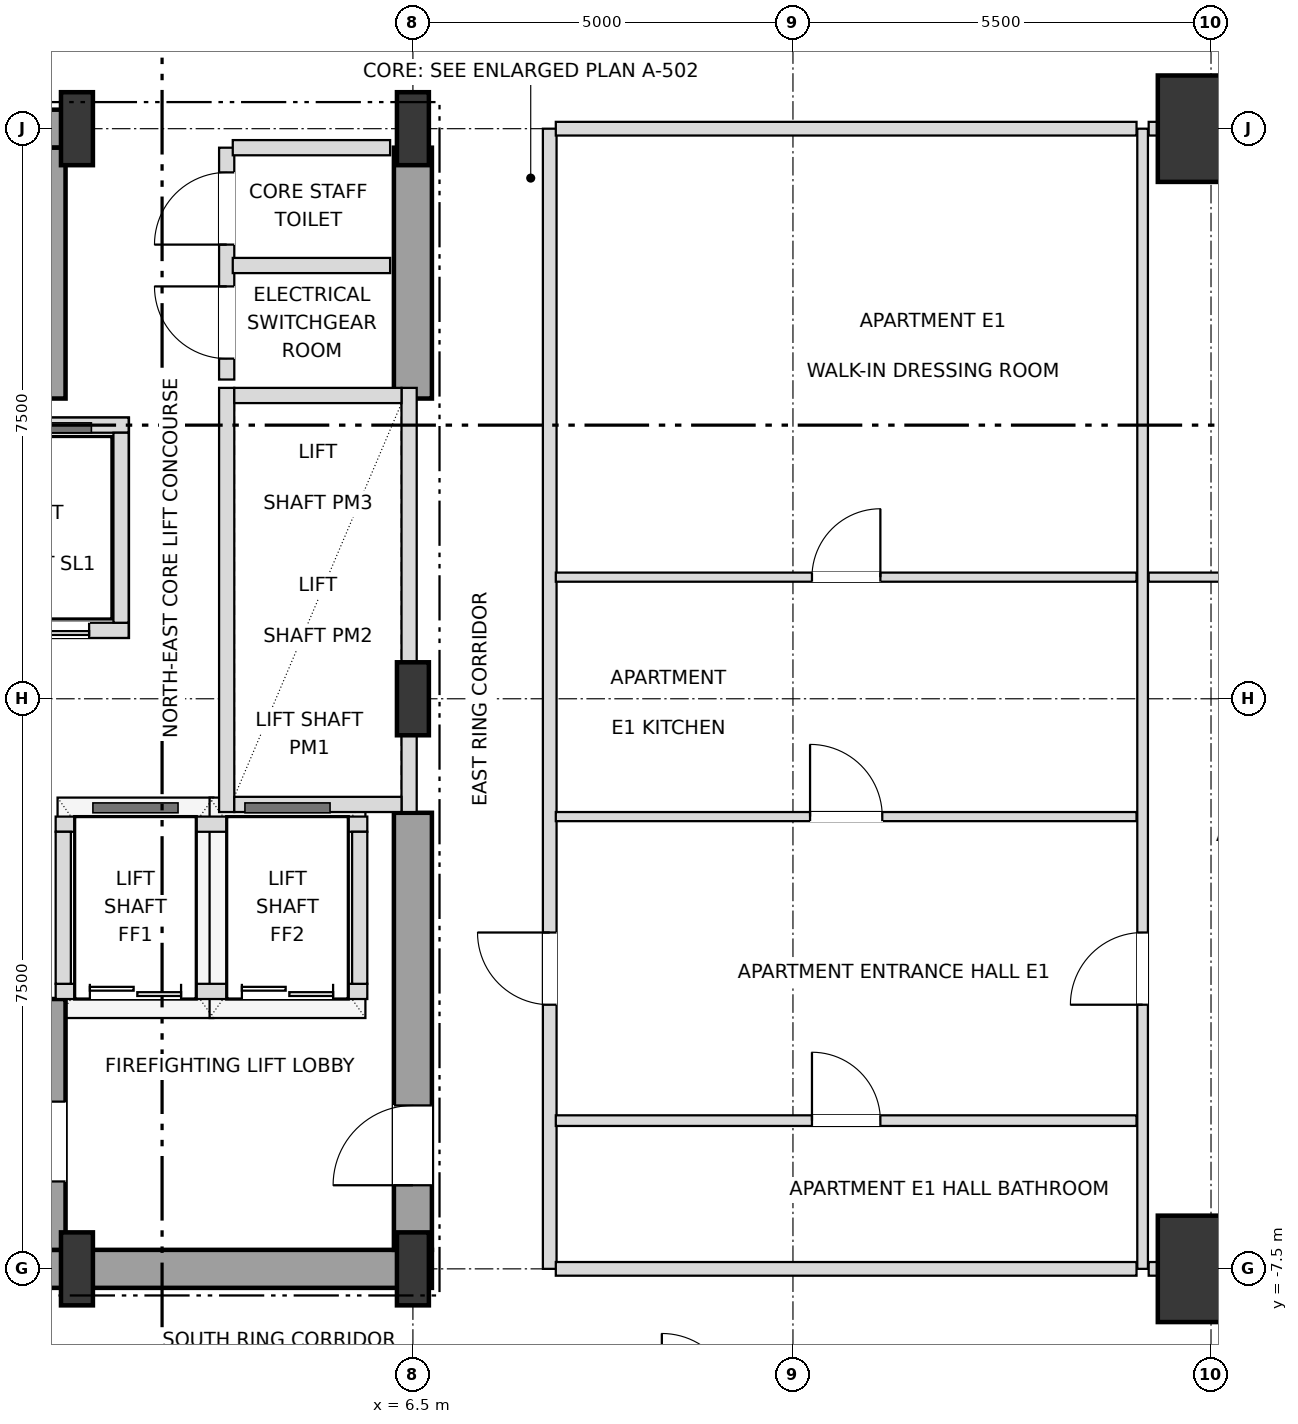
"""IFC4 building model, lengths in metres.
Left out: names, types, materials, properties, quantities, classifications, styles, units other than length and angle.
Written with IfcOpenShell. Run it as: python <this file> out.ifc"""

import sys

from ifc_helpers import new_model, si_unit, direction, frame, frame_2d, origin, origin_2d, place, context, subcontext, project, spatial, rectangle, i_section, extrude, element, fill, save


model = new_model("IFC4")
c1 = context("Model", 3, precision=1e-05, world=origin(), true_north=direction((0.0, 1.0)))
c2 = subcontext(c1, "Body", "Model", "MODEL_VIEW")
j1 = project(units=[si_unit("LENGTHUNIT", "METRE"), si_unit("PLANEANGLEUNIT", "RADIAN")], contexts=[c1])
p1 = place(None, origin())
s1 = spatial("IfcSite", under=j1, at=p1, CompositionType="ELEMENT")
p2 = place(p1, origin())
s2 = spatial("IfcBuilding", under=s1, at=p2, CompositionType="ELEMENT")
p3 = place(p2, frame((0.0, 0.0, 39.6)))
s3 = spatial("IfcBuildingStorey", under=s2, at=p3, CompositionType="ELEMENT", Elevation=39.6)
for number, where, z_axis, x_axis in (
    (1, (2.08, -7.5, 0.0), (0.0, 0.0, 1.0), (1.0, 0.0, 0.0)),
    (2, (6.5, -7.5, 0.0), (0.0, 0.0, 1.0), (1.0, 0.0, 0.0)),
    (3, (6.5, 0.0, 0.0), (0.0, 0.0, 1.0), (1.0, 0.0, 0.0)),
    (4, (2.08, 7.5, 0.0), (0.0, 0.0, 1.0), (1.0, 0.0, 0.0)),
    (5, (6.5, 7.5, 0.0), (0.0, 0.0, 1.0), (1.0, 0.0, 0.0)),
):
    element("IfcColumn", number, at=place(p3, frame(where, z_axis=z_axis, x_axis=x_axis)), inside=s3, PredefinedType="COLUMN", context=c2, shape_type="SweptSolid", body=[
        extrude(i_section(OverallWidth=0.42, OverallDepth=0.96, WebThickness=0.022, FlangeThickness=0.034, at=origin_2d()), origin(), (0.0, 0.0, 1.0), 3.6),
    ])
for number, where, z_axis, x_axis in (
    (6, (17.0, -7.5, 0.0), (0.0, 0.0, 1.0), (1.0, 0.0, 0.0)),
    (7, (17.0, 7.5, 0.0), (0.0, 0.0, 1.0), (1.0, 0.0, 0.0)),
):
    element("IfcColumn", number, at=place(p3, frame(where, z_axis=z_axis, x_axis=x_axis)), inside=s3, PredefinedType="USERDEFINED", context=c2, shape_type="SweptSolid", body=[
        extrude(rectangle(XDim=1.4, YDim=1.4, at=origin_2d()), origin(), (0.0, 0.0, 1.0), 3.6),
    ])
p4 = place(p3, frame((0.0, -7.5, 0.0), z_axis=(0.0, 0.0, 1.0), x_axis=(1.0, 0.0, 0.0)))
e8 = element("IfcWall", 8, at=p4, inside=s3, PredefinedType="SHEAR", context=c2, shape_type="SweptSolid", body=[
    extrude(rectangle(XDim=6.75, YDim=0.5, at=frame_2d((3.375, 0.0))), origin(), (0.0, 0.0, 1.0), 3.38),
])
p5 = place(p3, frame((0.0, 7.5, 0.0), z_axis=(0.0, 0.0, 1.0), x_axis=(1.0, 0.0, 0.0)))
e9 = element("IfcWall", 9, at=p5, inside=s3, PredefinedType="SHEAR", context=c2, shape_type="SweptSolid", body=[
    extrude(rectangle(XDim=2.08, YDim=0.5, at=frame_2d((1.04, 0.0))), origin(), (0.0, 0.0, 1.0), 3.38),
])
p6 = place(p3, frame((6.5, -7.25, 0.0), z_axis=(0.0, 0.0, 1.0), x_axis=(0.0, 1.0, 0.0)))
e10 = element("IfcWall", 10, at=p6, inside=s3, PredefinedType="SHEAR", context=c2, shape_type="SweptSolid", body=[
    extrude(rectangle(XDim=5.75, YDim=0.5, at=frame_2d((2.875, 0.0))), origin(), (0.0, 0.0, 1.0), 3.38),
])
p7 = place(p6, frame((0.85, 0.0, 0.0)))
e11 = element("IfcOpeningElement", 11, at=p7, cuts=e10, PredefinedType="OPENING", context=c2, shape_type="SweptSolid", body=[
    extrude(rectangle(XDim=1.05, YDim=2.15, at=frame_2d((0.525, 1.075))), frame((0.0, 0.26, 0.0), z_axis=(0.0, -1.0, 0.0), x_axis=(1.0, 0.0, 0.0)), (0.0, 0.0, 1.0), 0.52),
])
p8 = place(p3, frame((6.5, 3.95, 0.0), z_axis=(0.0, 0.0, 1.0), x_axis=(0.0, 1.0, 0.0)))
e12 = element("IfcWall", 12, at=p8, inside=s3, PredefinedType="SHEAR", context=c2, shape_type="SweptSolid", body=[
    extrude(rectangle(XDim=3.3, YDim=0.5, at=frame_2d((1.65, 0.0))), origin(), (0.0, 0.0, 1.0), 3.38),
])
p9 = place(p3, frame((1.73, -7.25, 0.0), z_axis=(0.0, 0.0, 1.0), x_axis=(0.0, 1.0, 0.0)))
e13 = element("IfcWall", 13, at=p9, inside=s3, PredefinedType="SHEAR", context=c2, shape_type="SweptSolid", body=[
    extrude(rectangle(XDim=3.3, YDim=0.4, at=frame_2d((1.65, 0.0))), origin(), (0.0, 0.0, 1.0), 3.38),
])
p10 = place(p9, frame((0.9, 0.0, 0.0)))
e14 = element("IfcOpeningElement", 14, at=p10, cuts=e13, PredefinedType="OPENING", context=c2, shape_type="SweptSolid", body=[
    extrude(rectangle(XDim=1.05, YDim=2.15, at=frame_2d((0.525, 1.075))), frame((0.0, 0.21, 0.0), z_axis=(0.0, -1.0, 0.0), x_axis=(1.0, 0.0, 0.0)), (0.0, 0.0, 1.0), 0.42),
])
p11 = place(p3, frame((1.73, 3.95, 0.0), z_axis=(0.0, 0.0, 1.0), x_axis=(0.0, 1.0, 0.0)))
e15 = element("IfcWall", 15, at=p11, inside=s3, PredefinedType="SHEAR", context=c2, shape_type="SweptSolid", body=[
    extrude(rectangle(XDim=3.3, YDim=0.4, at=frame_2d((1.65, 0.0))), origin(), (0.0, 0.0, 1.0), 3.38),
])
p12 = place(p3, frame((4.05, -1.49, 0.0), z_axis=(0.0, 0.0, 1.0), x_axis=(0.0, 1.0, 0.0)))
e16 = element("IfcWall", 16, at=p12, inside=s3, PredefinedType="SOLIDWALL", context=c2, shape_type="SweptSolid", body=[
    extrude(rectangle(XDim=5.58, YDim=0.2, at=frame_2d((2.79, 0.0))), origin(), (0.0, 0.0, 1.0), 3.38),
])
p13 = place(p3, frame((6.45, -1.49, 0.0), z_axis=(0.0, 0.0, 1.0), x_axis=(0.0, 1.0, 0.0)))
e17 = element("IfcWall", 17, at=p13, inside=s3, PredefinedType="SOLIDWALL", context=c2, shape_type="SweptSolid", body=[
    extrude(rectangle(XDim=5.58, YDim=0.2, at=frame_2d((2.79, 0.0))), origin(), (0.0, 0.0, 1.0), 2.816),
])
for number, where, z_axis, x_axis in (
    (18, (4.15, -1.39, 0.0), (0.0, 0.0, 1.0), (1.0, 0.0, 0.0)),
    (19, (4.15, 3.99, 0.0), (0.0, 0.0, 1.0), (1.0, 0.0, 0.0)),
):
    element("IfcWall", number, at=place(p3, frame(where, z_axis=z_axis, x_axis=x_axis)), inside=s3, PredefinedType="SOLIDWALL", context=c2, shape_type="SweptSolid", body=[
        extrude(rectangle(XDim=2.2, YDim=0.2, at=frame_2d((1.1, 0.0))), origin(), (0.0, 0.0, 1.0), 3.38),
    ])
p14 = place(p3, frame((-2.82, 0.9, 0.0), z_axis=(0.0, 0.0, 1.0), x_axis=(1.0, 0.0, 0.0)))
e20 = element("IfcWall", 20, at=p14, inside=s3, PredefinedType="SOLIDWALL", context=c2, shape_type="SweptSolid", body=[
    extrude(rectangle(XDim=5.58, YDim=0.2, at=frame_2d((2.79, 0.0))), origin(), (0.0, 0.0, 1.0), 3.38),
])
p15 = place(p14, frame((3.86, 0.0, 0.0)))
e21 = element("IfcOpeningElement", 21, at=p15, cuts=e20, PredefinedType="OPENING", context=c2, shape_type="SweptSolid", body=[
    extrude(rectangle(XDim=1.2, YDim=2.2, at=frame_2d((0.6, 1.1))), frame((0.0, 0.11, 0.0), z_axis=(0.0, -1.0, 0.0), x_axis=(1.0, 0.0, 0.0)), (0.0, 0.0, 1.0), 0.22),
])
p16 = place(p3, frame((-2.82, 3.6, 0.0), z_axis=(0.0, 0.0, 1.0), x_axis=(1.0, 0.0, 0.0)))
e22 = element("IfcWall", 22, at=p16, inside=s3, PredefinedType="SOLIDWALL", context=c2, shape_type="SweptSolid", body=[
    extrude(rectangle(XDim=5.58, YDim=0.2, at=frame_2d((2.79, 0.0))), origin(), (0.0, 0.0, 1.0), 3.38),
])
p17 = place(p3, frame((2.66, 1.0, 0.0), z_axis=(0.0, 0.0, 1.0), x_axis=(0.0, 1.0, 0.0)))
e23 = element("IfcWall", 23, at=p17, inside=s3, PredefinedType="SOLIDWALL", context=c2, shape_type="SweptSolid", body=[
    extrude(rectangle(XDim=2.5, YDim=0.2, at=frame_2d((1.25, 0.0))), origin(), (0.0, 0.0, 1.0), 3.38),
])
p18 = place(p3, frame((1.8, -3.85, 0.0), z_axis=(0.0, 0.0, 1.0), x_axis=(1.0, 0.0, 0.0)))
e24 = element("IfcWall", 24, at=p18, inside=s3, PredefinedType="SOLIDWALL", context=c2, shape_type="SweptSolid", body=[
    extrude(rectangle(XDim=4.1, YDim=0.2, at=frame_2d((2.05, 0.0))), origin(), (0.0, 0.0, 1.0), 3.38),
])
p19 = place(p18, frame((0.45, 0.0, 0.0)))
e25 = element("IfcOpeningElement", 25, at=p19, cuts=e24, PredefinedType="OPENING", context=c2, shape_type="SweptSolid", body=[
    extrude(rectangle(XDim=1.2, YDim=2.2, at=frame_2d((0.6, 1.1))), frame((0.0, 0.11, 0.0), z_axis=(0.0, -1.0, 0.0), x_axis=(1.0, 0.0, 0.0)), (0.0, 0.0, 1.0), 0.22),
])
p20 = place(p18, frame((2.45, 0.0, 0.0)))
e26 = element("IfcOpeningElement", 26, at=p20, cuts=e24, PredefinedType="OPENING", context=c2, shape_type="SweptSolid", body=[
    extrude(rectangle(XDim=1.2, YDim=2.2, at=frame_2d((0.6, 1.1))), frame((0.0, 0.11, 0.0), z_axis=(0.0, -1.0, 0.0), x_axis=(1.0, 0.0, 0.0)), (0.0, 0.0, 1.0), 0.22),
])
p21 = place(p3, frame((1.8, -1.65, 0.0), z_axis=(0.0, 0.0, 1.0), x_axis=(1.0, 0.0, 0.0)))
e27 = element("IfcWall", 27, at=p21, inside=s3, PredefinedType="SOLIDWALL", context=c2, shape_type="SweptSolid", body=[
    extrude(rectangle(XDim=4.1, YDim=0.2, at=frame_2d((2.05, 0.0))), origin(), (0.0, 0.0, 1.0), 3.38),
])
for number, where, z_axis, x_axis in (
    (28, (1.9, -3.75, 0.0), (0.0, 0.0, 1.0), (0.0, 1.0, 0.0)),
    (29, (5.8, -3.75, 0.0), (0.0, 0.0, 1.0), (0.0, 1.0, 0.0)),
):
    element("IfcWall", number, at=place(p3, frame(where, z_axis=z_axis, x_axis=x_axis)), inside=s3, PredefinedType="SOLIDWALL", context=c2, shape_type="SweptSolid", body=[
        extrude(rectangle(XDim=2.0, YDim=0.2, at=frame_2d((1.0, 0.0))), origin(), (0.0, 0.0, 1.0), 3.38),
    ])
p22 = place(p3, frame((4.05, 4.2, 0.0), z_axis=(0.0, 0.0, 1.0), x_axis=(0.0, 1.0, 0.0)))
e30 = element("IfcWall", 30, at=p22, inside=s3, PredefinedType="SOLIDWALL", context=c2, shape_type="SweptSolid", body=[
    extrude(rectangle(XDim=3.05, YDim=0.2, at=frame_2d((1.525, 0.0))), origin(), (0.0, 0.0, 1.0), 3.38),
])
p23 = place(p22, frame((0.275, 0.0, 0.0)))
e31 = element("IfcOpeningElement", 31, at=p23, cuts=e30, PredefinedType="OPENING", context=c2, shape_type="SweptSolid", body=[
    extrude(rectangle(XDim=0.95, YDim=2.15, at=frame_2d((0.475, 1.075))), frame((0.0, 0.11, 0.0), z_axis=(0.0, -1.0, 0.0), x_axis=(1.0, 0.0, 0.0)), (0.0, 0.0, 1.0), 0.22),
])
p24 = place(p22, frame((1.775, 0.0, 0.0)))
e32 = element("IfcOpeningElement", 32, at=p24, cuts=e30, PredefinedType="OPENING", context=c2, shape_type="SweptSolid", body=[
    extrude(rectangle(XDim=0.95, YDim=2.15, at=frame_2d((0.475, 1.075))), frame((0.0, 0.11, 0.0), z_axis=(0.0, -1.0, 0.0), x_axis=(1.0, 0.0, 0.0)), (0.0, 0.0, 1.0), 0.22),
])
p25 = place(p3, frame((8.3, -7.5, 0.0), z_axis=(0.0, 0.0, 1.0), x_axis=(0.0, 1.0, 0.0)))
e33 = element("IfcWall", 33, at=p25, inside=s3, PredefinedType="PARTITIONING", context=c2, shape_type="SweptSolid", body=[
    extrude(rectangle(XDim=15.0, YDim=0.18, at=frame_2d((7.5, 0.0))), origin(), (0.0, 0.0, 1.0), 3.38),
])
p26 = place(p25, frame((3.475, 0.0, 0.0)))
e34 = element("IfcOpeningElement", 34, at=p26, cuts=e33, PredefinedType="OPENING", context=c2, shape_type="SweptSolid", body=[
    extrude(rectangle(XDim=0.95, YDim=2.15, at=frame_2d((0.475, 1.075))), frame((0.0, 0.1, 0.0), z_axis=(0.0, -1.0, 0.0), x_axis=(1.0, 0.0, 0.0)), (0.0, 0.0, 1.0), 0.2),
])
p27 = place(p3, frame((16.1, -7.5, 0.0), z_axis=(0.0, 0.0, 1.0), x_axis=(0.0, 1.0, 0.0)))
e35 = element("IfcWall", 35, at=p27, inside=s3, PredefinedType="PARTITIONING", context=c2, shape_type="SweptSolid", body=[
    extrude(rectangle(XDim=15.0, YDim=0.14, at=frame_2d((7.5, 0.0))), origin(), (0.0, 0.0, 1.0), 3.38),
])
p28 = place(p27, frame((3.475, 0.0, 0.0)))
e36 = element("IfcOpeningElement", 36, at=p28, cuts=e35, PredefinedType="OPENING", context=c2, shape_type="SweptSolid", body=[
    extrude(rectangle(XDim=0.95, YDim=2.1, at=frame_2d((0.475, 1.05))), frame((0.0, 0.08, 0.0), z_axis=(0.0, -1.0, 0.0), x_axis=(1.0, 0.0, 0.0)), (0.0, 0.0, 1.0), 0.16),
])
p29 = place(p3, frame((8.38, -7.5, 0.0), z_axis=(0.0, 0.0, 1.0), x_axis=(1.0, 0.0, 0.0)))
e37 = element("IfcWall", 37, at=p29, inside=s3, PredefinedType="PARTITIONING", context=c2, shape_type="SweptSolid", body=[
    extrude(rectangle(XDim=7.64, YDim=0.18, at=frame_2d((3.82, 0.0))), origin(), (0.0, 0.0, 1.0), 2.816),
])
p30 = place(p3, frame((16.18, -7.5, 0.0), z_axis=(0.0, 0.0, 1.0), x_axis=(1.0, 0.0, 0.0)))
e38 = element("IfcWall", 38, at=p30, inside=s3, PredefinedType="PARTITIONING", context=c2, shape_type="SweptSolid", body=[
    extrude(rectangle(XDim=5.72, YDim=0.18, at=frame_2d((2.86, 0.0))), origin(), (0.0, 0.0, 1.0), 2.816),
])
p31 = place(p3, frame((8.38, -5.55, 0.0), z_axis=(0.0, 0.0, 1.0), x_axis=(1.0, 0.0, 0.0)))
e39 = element("IfcWall", 39, at=p31, inside=s3, PredefinedType="PARTITIONING", context=c2, shape_type="SweptSolid", body=[
    extrude(rectangle(XDim=7.64, YDim=0.14, at=frame_2d((3.82, 0.0))), origin(), (0.0, 0.0, 1.0), 2.948),
])
p32 = place(p31, frame((3.37, 0.0, 0.0)))
e40 = element("IfcOpeningElement", 40, at=p32, cuts=e39, PredefinedType="OPENING", context=c2, shape_type="SweptSolid", body=[
    extrude(rectangle(XDim=0.9, YDim=2.1, at=frame_2d((0.45, 1.05))), frame((0.0, 0.08, 0.0), z_axis=(0.0, -1.0, 0.0), x_axis=(1.0, 0.0, 0.0)), (0.0, 0.0, 1.0), 0.16),
])
p33 = place(p3, frame((8.38, -1.55, 0.0), z_axis=(0.0, 0.0, 1.0), x_axis=(1.0, 0.0, 0.0)))
e41 = element("IfcWall", 41, at=p33, inside=s3, PredefinedType="PARTITIONING", context=c2, shape_type="SweptSolid", body=[
    extrude(rectangle(XDim=7.64, YDim=0.12, at=frame_2d((3.82, 0.0))), origin(), (0.0, 0.0, 1.0), 2.948),
])
p34 = place(p33, frame((3.345, 0.0, 0.0)))
e42 = element("IfcOpeningElement", 42, at=p34, cuts=e41, PredefinedType="OPENING", context=c2, shape_type="SweptSolid", body=[
    extrude(rectangle(XDim=0.95, YDim=2.1, at=frame_2d((0.475, 1.05))), frame((0.0, 0.07, 0.0), z_axis=(0.0, -1.0, 0.0), x_axis=(1.0, 0.0, 0.0)), (0.0, 0.0, 1.0), 0.14),
])
p35 = place(p3, frame((8.38, 1.6, 0.0), z_axis=(0.0, 0.0, 1.0), x_axis=(1.0, 0.0, 0.0)))
e43 = element("IfcWall", 43, at=p35, inside=s3, PredefinedType="PARTITIONING", context=c2, shape_type="SweptSolid", body=[
    extrude(rectangle(XDim=7.64, YDim=0.12, at=frame_2d((3.82, 0.0))), origin(), (0.0, 0.0, 1.0), 2.948),
])
p36 = place(p35, frame((3.37, 0.0, 0.0)))
e44 = element("IfcOpeningElement", 44, at=p36, cuts=e43, PredefinedType="OPENING", context=c2, shape_type="SweptSolid", body=[
    extrude(rectangle(XDim=0.9, YDim=2.1, at=frame_2d((0.45, 1.05))), frame((0.0, 0.07, 0.0), z_axis=(0.0, -1.0, 0.0), x_axis=(1.0, 0.0, 0.0)), (0.0, 0.0, 1.0), 0.14),
])
p37 = place(p3, frame((16.18, 1.6, 0.0), z_axis=(0.0, 0.0, 1.0), x_axis=(1.0, 0.0, 0.0)))
e45 = element("IfcWall", 45, at=p37, inside=s3, PredefinedType="PARTITIONING", context=c2, shape_type="SweptSolid", body=[
    extrude(rectangle(XDim=5.64, YDim=0.12, at=frame_2d((2.82, 0.0))), origin(), (0.0, 0.0, 1.0), 2.816),
])
p38 = place(p37, frame((2.37, 0.0, 0.0)))
e46 = element("IfcOpeningElement", 46, at=p38, cuts=e45, PredefinedType="OPENING", context=c2, shape_type="SweptSolid", body=[
    extrude(rectangle(XDim=0.9, YDim=2.1, at=frame_2d((0.45, 1.05))), frame((0.0, 0.07, 0.0), z_axis=(0.0, -1.0, 0.0), x_axis=(1.0, 0.0, 0.0)), (0.0, 0.0, 1.0), 0.14),
])
for number, where, z_axis, x_axis in (
    (47, (4.13, 5.7, 0.0), (0.0, 0.0, 1.0), (1.0, 0.0, 0.0)),
    (48, (4.13, 7.25, 0.0), (0.0, 0.0, 1.0), (1.0, 0.0, 0.0)),
):
    element("IfcWall", number, at=place(p3, frame(where, z_axis=z_axis, x_axis=x_axis)), inside=s3, PredefinedType="SOLIDWALL", context=c2, shape_type="SweptSolid", body=[
        extrude(rectangle(XDim=2.07, YDim=0.2, at=frame_2d((1.035, 0.0))), origin(), (0.0, 0.0, 1.0), 3.38),
    ])
p39 = place(p3, frame((8.38, 7.5, 0.0), z_axis=(0.0, 0.0, 1.0), x_axis=(1.0, 0.0, 0.0)))
e49 = element("IfcWall", 49, at=p39, inside=s3, PredefinedType="PARTITIONING", context=c2, shape_type="SweptSolid", body=[
    extrude(rectangle(XDim=7.64, YDim=0.18, at=frame_2d((3.82, 0.0))), origin(), (0.0, 0.0, 1.0), 2.816),
])
p40 = place(p3, frame((16.18, 7.5, 0.0), z_axis=(0.0, 0.0, 1.0), x_axis=(1.0, 0.0, 0.0)))
e50 = element("IfcWall", 50, at=p40, inside=s3, PredefinedType="PARTITIONING", context=c2, shape_type="SweptSolid", body=[
    extrude(rectangle(XDim=5.72, YDim=0.18, at=frame_2d((2.86, 0.0))), origin(), (0.0, 0.0, 1.0), 2.816),
])
p41 = place(p7, origin())
e51 = element("IfcDoor", 51, at=p41, inside=s3, OperationType="SINGLE_SWING_LEFT", PredefinedType="DOOR", context=c2, shape_type="SweptSolid", body=[
    extrude(rectangle(XDim=1.05, YDim=2.15, at=frame_2d((0.525, 1.075))), frame((0.0, 0.025, 0.0), z_axis=(0.0, -1.0, 0.0), x_axis=(1.0, 0.0, 0.0)), (0.0, 0.0, 1.0), 0.05),
])
fill(e11, e51)
p42 = place(p15, origin())
e52 = element("IfcDoor", 52, at=p42, inside=s3, OperationType="DOUBLE_DOOR_SLIDING", PredefinedType="DOOR", context=c2, shape_type="SweptSolid", body=[
    extrude(rectangle(XDim=1.2, YDim=2.2, at=frame_2d((0.6, 1.1))), frame((0.0, 0.025, 0.0), z_axis=(0.0, -1.0, 0.0), x_axis=(1.0, 0.0, 0.0)), (0.0, 0.0, 1.0), 0.05),
])
fill(e21, e52)
p43 = place(p19, origin())
e53 = element("IfcDoor", 53, at=p43, inside=s3, OperationType="DOUBLE_DOOR_SLIDING", PredefinedType="DOOR", context=c2, shape_type="SweptSolid", body=[
    extrude(rectangle(XDim=1.2, YDim=2.2, at=frame_2d((0.6, 1.1))), frame((0.0, 0.025, 0.0), z_axis=(0.0, -1.0, 0.0), x_axis=(1.0, 0.0, 0.0)), (0.0, 0.0, 1.0), 0.05),
])
fill(e25, e53)
p44 = place(p20, origin())
e54 = element("IfcDoor", 54, at=p44, inside=s3, OperationType="DOUBLE_DOOR_SLIDING", PredefinedType="DOOR", context=c2, shape_type="SweptSolid", body=[
    extrude(rectangle(XDim=1.2, YDim=2.2, at=frame_2d((0.6, 1.1))), frame((0.0, 0.025, 0.0), z_axis=(0.0, -1.0, 0.0), x_axis=(1.0, 0.0, 0.0)), (0.0, 0.0, 1.0), 0.05),
])
fill(e26, e54)
p45 = place(p23, origin())
e55 = element("IfcDoor", 55, at=p45, inside=s3, OperationType="SINGLE_SWING_RIGHT", PredefinedType="DOOR", context=c2, shape_type="SweptSolid", body=[
    extrude(rectangle(XDim=0.95, YDim=2.15, at=frame_2d((0.475, 1.075))), frame((0.0, 0.025, 0.0), z_axis=(0.0, -1.0, 0.0), x_axis=(1.0, 0.0, 0.0)), (0.0, 0.0, 1.0), 0.05),
])
fill(e31, e55)
p46 = place(p24, origin())
e56 = element("IfcDoor", 56, at=p46, inside=s3, OperationType="SINGLE_SWING_LEFT", PredefinedType="DOOR", context=c2, shape_type="SweptSolid", body=[
    extrude(rectangle(XDim=0.95, YDim=2.15, at=frame_2d((0.475, 1.075))), frame((0.0, 0.025, 0.0), z_axis=(0.0, -1.0, 0.0), x_axis=(1.0, 0.0, 0.0)), (0.0, 0.0, 1.0), 0.05),
])
fill(e32, e56)
p47 = place(p32, origin())
e57 = element("IfcDoor", 57, at=p47, inside=s3, OperationType="SINGLE_SWING_LEFT", PredefinedType="DOOR", context=c2, shape_type="SweptSolid", body=[
    extrude(rectangle(XDim=0.9, YDim=2.1, at=frame_2d((0.45, 1.05))), frame((0.0, 0.025, 0.0), z_axis=(0.0, -1.0, 0.0), x_axis=(1.0, 0.0, 0.0)), (0.0, 0.0, 1.0), 0.05),
])
fill(e40, e57)
p48 = place(p26, origin())
e58 = element("IfcDoor", 58, at=p48, inside=s3, OperationType="SINGLE_SWING_RIGHT", PredefinedType="DOOR", context=c2, shape_type="SweptSolid", body=[
    extrude(rectangle(XDim=0.95, YDim=2.15, at=frame_2d((0.475, 1.075))), frame((0.0, 0.025, 0.0), z_axis=(0.0, -1.0, 0.0), x_axis=(1.0, 0.0, 0.0)), (0.0, 0.0, 1.0), 0.05),
])
fill(e34, e58)
p49 = place(p34, origin())
e59 = element("IfcDoor", 59, at=p49, inside=s3, OperationType="SINGLE_SWING_LEFT", PredefinedType="DOOR", context=c2, shape_type="SweptSolid", body=[
    extrude(rectangle(XDim=0.95, YDim=2.1, at=frame_2d((0.475, 1.05))), frame((0.0, 0.025, 0.0), z_axis=(0.0, -1.0, 0.0), x_axis=(1.0, 0.0, 0.0)), (0.0, 0.0, 1.0), 0.05),
])
fill(e42, e59)
p50 = place(p36, origin())
e60 = element("IfcDoor", 60, at=p50, inside=s3, OperationType="SINGLE_SWING_RIGHT", PredefinedType="DOOR", context=c2, shape_type="SweptSolid", body=[
    extrude(rectangle(XDim=0.9, YDim=2.1, at=frame_2d((0.45, 1.05))), frame((0.0, 0.025, 0.0), z_axis=(0.0, -1.0, 0.0), x_axis=(1.0, 0.0, 0.0)), (0.0, 0.0, 1.0), 0.05),
])
fill(e44, e60)
p51 = place(p28, origin())
e61 = element("IfcDoor", 61, at=p51, inside=s3, OperationType="SINGLE_SWING_LEFT", PredefinedType="DOOR", context=c2, shape_type="SweptSolid", body=[
    extrude(rectangle(XDim=0.95, YDim=2.1, at=frame_2d((0.475, 1.05))), frame((0.0, 0.025, 0.0), z_axis=(0.0, -1.0, 0.0), x_axis=(1.0, 0.0, 0.0)), (0.0, 0.0, 1.0), 0.05),
])
fill(e36, e61)
save(model, sys.argv[1])
